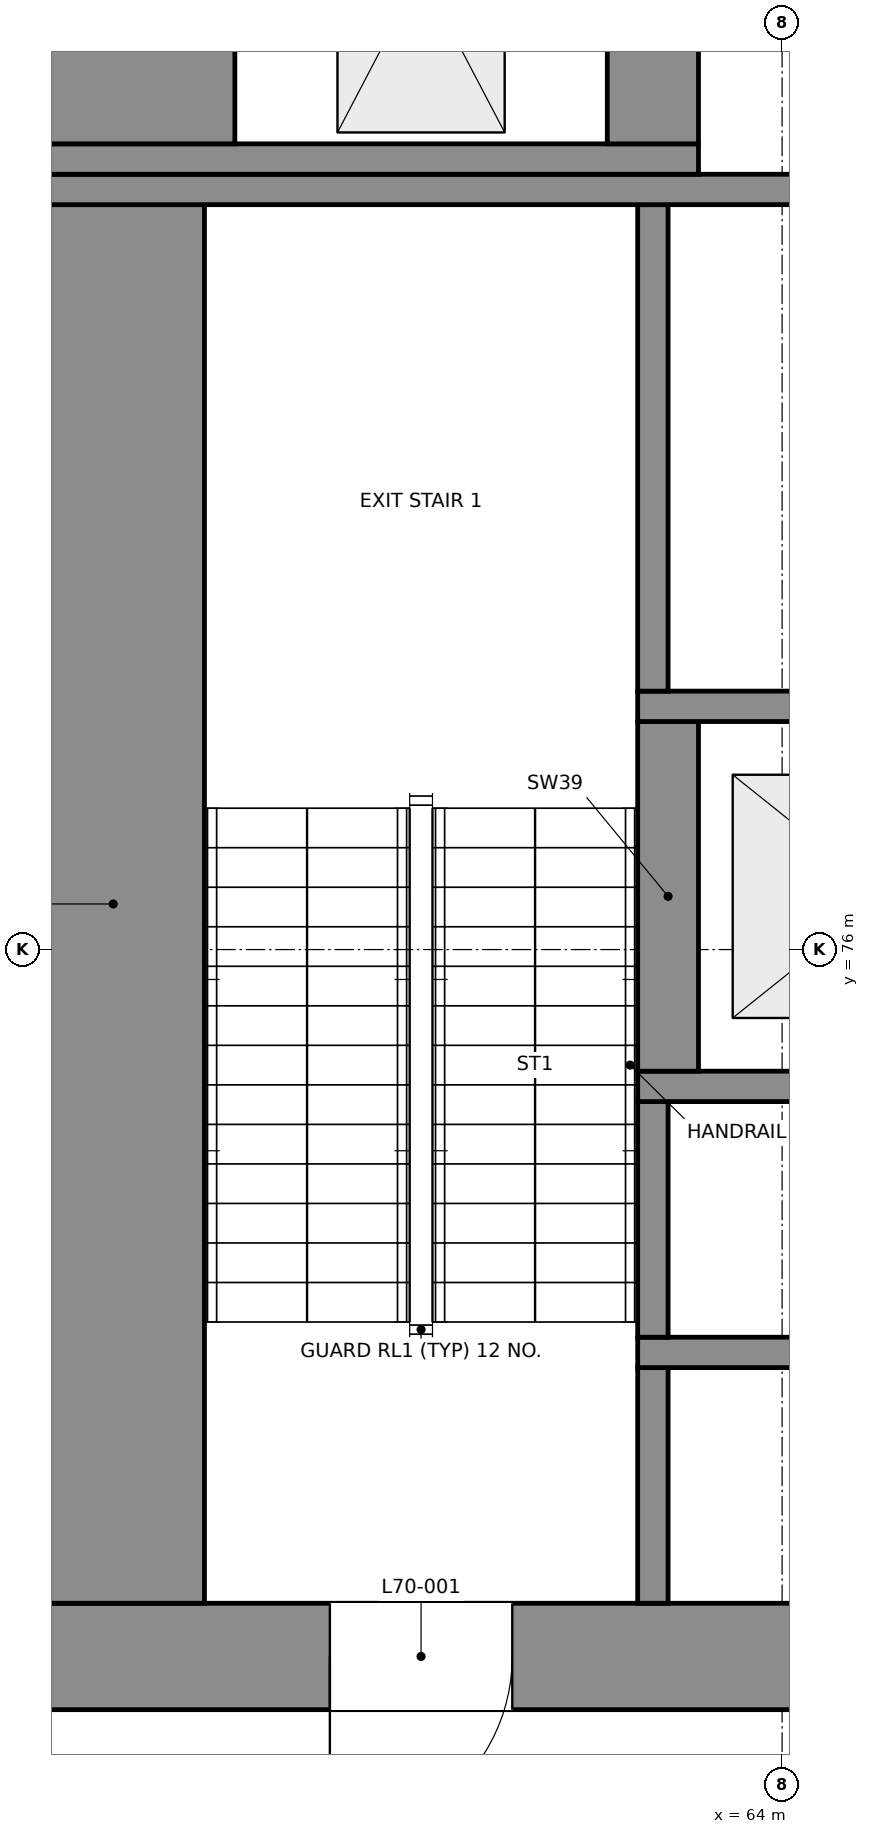
"""IFC4 building model, lengths in metres.
Left out: names, types, materials, properties, quantities, classifications, styles, units other than length and angle.
Written with IfcOpenShell. Run it as: python <this file> out.ifc"""

import sys

from ifc_helpers import new_model, si_unit, direction, frame, frame_2d, origin, place, context, subcontext, project, spatial, rectangle, extrude, element, fill, save


model = new_model("IFC4")
c1 = context("Model", 3, precision=1e-05, world=origin(), true_north=direction((0.0, 1.0)))
c2 = subcontext(c1, "Body", "Model", "MODEL_VIEW")
j1 = project(units=[si_unit("LENGTHUNIT", "METRE"), si_unit("PLANEANGLEUNIT", "RADIAN")], contexts=[c1])
p1 = place(None, origin())
s1 = spatial("IfcSite", under=j1, at=p1, CompositionType="ELEMENT")
p2 = place(p1, origin())
s2 = spatial("IfcBuilding", under=s1, at=p2, CompositionType="ELEMENT")
p3 = place(p2, frame((0.0, 0.0, 295.1)))
s3 = spatial("IfcBuildingStorey", under=s2, at=p3, CompositionType="ELEMENT", Elevation=295.1)
p4 = place(p3, frame((59.0, 71.35, 0.0), z_axis=(0.0, 0.0, 1.0), x_axis=(1.0, 0.0, 0.0)))
e1 = element("IfcWall", 1, at=p4, inside=s3, PredefinedType="SHEAR", context=c2, shape_type="SweptSolid", body=[
    extrude(rectangle(XDim=22.0, YDim=0.7, at=frame_2d((11.0, 0.0))), origin(), (0.0, 0.0, 1.0), 5.0),
])
p5 = place(p4, frame((2.025, 0.0, 0.0)))
e2 = element("IfcOpeningElement", 2, at=p5, cuts=e1, PredefinedType="OPENING", context=c2, shape_type="SweptSolid", body=[
    extrude(rectangle(XDim=1.2, YDim=2.1, at=frame_2d((0.6, 1.05))), frame((0.0, 0.36, 0.0), z_axis=(0.0, -1.0, 0.0), x_axis=(1.0, 0.0, 0.0)), (0.0, 0.0, 1.0), 0.72),
])
p6 = place(p4, frame((18.775, 0.0, 0.0)))
e3 = element("IfcOpeningElement", 3, at=p6, cuts=e1, PredefinedType="OPENING", context=c2, shape_type="SweptSolid", body=[
    extrude(rectangle(XDim=1.2, YDim=2.1, at=frame_2d((0.6, 1.05))), frame((0.0, 0.36, 0.0), z_axis=(0.0, -1.0, 0.0), x_axis=(1.0, 0.0, 0.0)), (0.0, 0.0, 1.0), 0.72),
])
p7 = place(p4, frame((10.0, 0.0, 0.0)))
e4 = element("IfcOpeningElement", 4, at=p7, cuts=e1, PredefinedType="OPENING", context=c2, shape_type="SweptSolid", body=[
    extrude(rectangle(XDim=2.0, YDim=2.1, at=frame_2d((1.0, 1.05))), frame((0.0, 0.36, 0.0), z_axis=(0.0, -1.0, 0.0), x_axis=(1.0, 0.0, 0.0)), (0.0, 0.0, 1.0), 0.72),
])
p8 = place(p3, frame((59.6, 71.7, 0.0), z_axis=(0.0, 0.0, 1.0), x_axis=(0.0, 1.0, 0.0)))
e5 = element("IfcWall", 5, at=p8, inside=s3, PredefinedType="SHEAR", context=c2, shape_type="SweptSolid", body=[
    extrude(rectangle(XDim=9.2, YDim=1.2, at=frame_2d((4.6, 0.0))), origin(), (0.0, 0.0, 1.0), 5.0),
])
p9 = place(p3, frame((63.15, 71.7, 0.0), z_axis=(0.0, 0.0, 1.0), x_axis=(0.0, 1.0, 0.0)))
e6 = element("IfcWall", 6, at=p9, inside=s3, PredefinedType="SHEAR", context=c2, shape_type="SweptSolid", body=[
    extrude(rectangle(XDim=1.55, YDim=0.2, at=frame_2d((0.775, 0.0))), origin(), (0.0, 0.0, 1.0), 5.0),
])
p10 = place(p3, frame((63.05, 73.35, 0.0), z_axis=(0.0, 0.0, 1.0), x_axis=(1.0, 0.0, 0.0)))
e7 = element("IfcWall", 7, at=p10, inside=s3, PredefinedType="SHEAR", context=c2, shape_type="SweptSolid", body=[
    extrude(rectangle(XDim=5.7, YDim=0.2, at=frame_2d((2.85, 0.0))), origin(), (0.0, 0.0, 1.0), 5.0),
])
p11 = place(p3, frame((63.15, 73.45, 0.0), z_axis=(0.0, 0.0, 1.0), x_axis=(0.0, 1.0, 0.0)))
e8 = element("IfcWall", 8, at=p11, inside=s3, PredefinedType="SHEAR", context=c2, shape_type="SweptSolid", body=[
    extrude(rectangle(XDim=1.55, YDim=0.2, at=frame_2d((0.775, 0.0))), origin(), (0.0, 0.0, 1.0), 5.0),
])
p12 = place(p3, frame((63.05, 75.1, 0.0), z_axis=(0.0, 0.0, 1.0), x_axis=(1.0, 0.0, 0.0)))
e9 = element("IfcWall", 9, at=p12, inside=s3, PredefinedType="SHEAR", context=c2, shape_type="SweptSolid", body=[
    extrude(rectangle(XDim=5.7, YDim=0.2, at=frame_2d((2.85, 0.0))), origin(), (0.0, 0.0, 1.0), 5.0),
])
p13 = place(p3, frame((63.25, 75.2, 0.0), z_axis=(0.0, 0.0, 1.0), x_axis=(0.0, 1.0, 0.0)))
e10 = element("IfcWall", 10, at=p13, inside=s3, PredefinedType="SHEAR", context=c2, shape_type="SweptSolid", body=[
    extrude(rectangle(XDim=2.3, YDim=0.4, at=frame_2d((1.15, 0.0))), origin(), (0.0, 0.0, 1.0), 5.0),
])
p14 = place(p3, frame((63.05, 77.6, 0.0), z_axis=(0.0, 0.0, 1.0), x_axis=(1.0, 0.0, 0.0)))
e11 = element("IfcWall", 11, at=p14, inside=s3, PredefinedType="SHEAR", context=c2, shape_type="SweptSolid", body=[
    extrude(rectangle(XDim=5.7, YDim=0.2, at=frame_2d((2.85, 0.0))), origin(), (0.0, 0.0, 1.0), 5.0),
])
p15 = place(p14, frame((1.075, 0.0, 0.0)))
e12 = element("IfcOpeningElement", 12, at=p15, cuts=e11, PredefinedType="OPENING", context=c2, shape_type="SweptSolid", body=[
    extrude(rectangle(XDim=1.1, YDim=2.1, at=frame_2d((0.55, 1.05))), frame((0.0, 0.11, 0.0), z_axis=(0.0, -1.0, 0.0), x_axis=(1.0, 0.0, 0.0)), (0.0, 0.0, 1.0), 0.22),
])
p16 = place(p14, frame((3.725, 0.0, 0.0)))
e13 = element("IfcOpeningElement", 13, at=p16, cuts=e11, PredefinedType="OPENING", context=c2, shape_type="SweptSolid", body=[
    extrude(rectangle(XDim=1.1, YDim=2.1, at=frame_2d((0.55, 1.05))), frame((0.0, 0.11, 0.0), z_axis=(0.0, -1.0, 0.0), x_axis=(1.0, 0.0, 0.0)), (0.0, 0.0, 1.0), 0.22),
])
p17 = place(p3, frame((63.15, 77.7, 0.0), z_axis=(0.0, 0.0, 1.0), x_axis=(0.0, 1.0, 0.0)))
e14 = element("IfcWall", 14, at=p17, inside=s3, PredefinedType="SHEAR", context=c2, shape_type="SweptSolid", body=[
    extrude(rectangle(XDim=3.2, YDim=0.2, at=frame_2d((1.6, 0.0))), origin(), (0.0, 0.0, 1.0), 5.0),
])
p18 = place(p3, frame((59.0, 81.0, 0.0), z_axis=(0.0, 0.0, 1.0), x_axis=(1.0, 0.0, 0.0)))
e15 = element("IfcWall", 15, at=p18, inside=s3, PredefinedType="SHEAR", context=c2, shape_type="SweptSolid", body=[
    extrude(rectangle(XDim=22.0, YDim=0.2, at=frame_2d((11.0, 0.0))), origin(), (0.0, 0.0, 1.0), 5.0),
])
p19 = place(p18, frame((11.85, 0.0, 0.0)))
e16 = element("IfcOpeningElement", 16, at=p19, cuts=e15, PredefinedType="OPENING", context=c2, shape_type="SweptSolid", body=[
    extrude(rectangle(XDim=0.9, YDim=2.1, at=frame_2d((0.45, 1.05))), frame((0.0, 0.11, 0.0), z_axis=(0.0, -1.0, 0.0), x_axis=(1.0, 0.0, 0.0)), (0.0, 0.0, 1.0), 0.22),
])
p20 = place(p3, frame((59.0, 81.2, 0.0), z_axis=(0.0, 0.0, 1.0), x_axis=(1.0, 0.0, 0.0)))
e17 = element("IfcWall", 17, at=p20, inside=s3, PredefinedType="SHEAR", context=c2, shape_type="SweptSolid", body=[
    extrude(rectangle(XDim=4.45, YDim=0.2, at=frame_2d((2.225, 0.0))), origin(), (0.0, 0.0, 1.0), 5.0),
])
p21 = place(p3, frame((59.7, 81.3, 0.0), z_axis=(0.0, 0.0, 1.0), x_axis=(0.0, 1.0, 0.0)))
e18 = element("IfcWall", 18, at=p21, inside=s3, PredefinedType="SHEAR", context=c2, shape_type="SweptSolid", body=[
    extrude(rectangle(XDim=2.25, YDim=1.4, at=frame_2d((1.125, 0.0))), origin(), (0.0, 0.0, 1.0), 5.0),
])
p22 = place(p3, frame((63.15, 81.3, 0.0), z_axis=(0.0, 0.0, 1.0), x_axis=(0.0, 1.0, 0.0)))
e19 = element("IfcWall", 19, at=p22, inside=s3, PredefinedType="SHEAR", context=c2, shape_type="SweptSolid", body=[
    extrude(rectangle(XDim=2.25, YDim=0.6, at=frame_2d((1.125, 0.0))), origin(), (0.0, 0.0, 1.0), 5.0),
])
p23 = place(p5, frame((1.2, 0.0, 0.0), z_axis=(0.0, 0.0, 1.0), x_axis=(-1.0, 0.0, 0.0)))
e20 = element("IfcDoor", 20, at=p23, inside=s3, OperationType="SINGLE_SWING_RIGHT", PredefinedType="DOOR", context=c2, shape_type="SweptSolid", body=[
    extrude(rectangle(XDim=1.2, YDim=2.1, at=frame_2d((0.6, 1.05))), frame((0.0, 0.025, 0.0), z_axis=(0.0, -1.0, 0.0), x_axis=(1.0, 0.0, 0.0)), (0.0, 0.0, 1.0), 0.05),
])
fill(e2, e20)
save(model, sys.argv[1])
